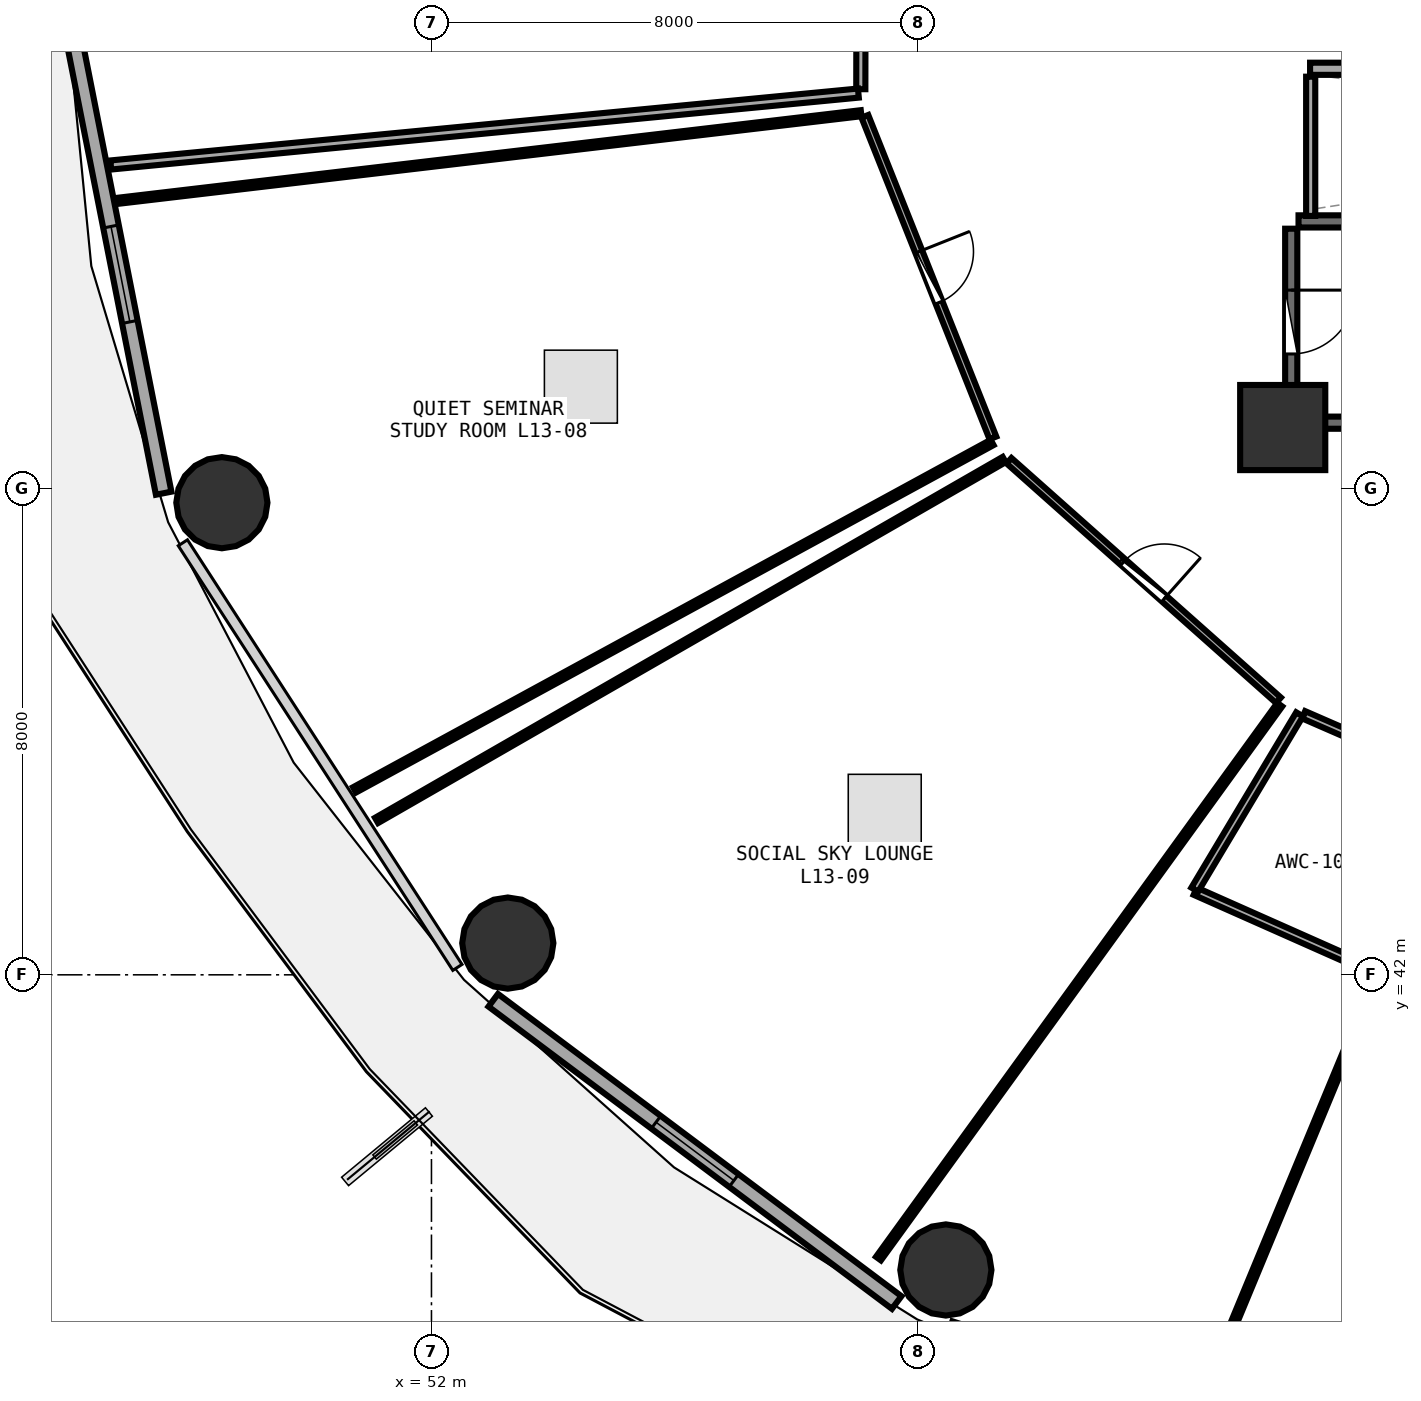
"""IFC4 building model, lengths in metres.
Left out: names, types, materials, properties, quantities, classifications, styles, units other than length and angle.
Written with IfcOpenShell. Run it as: python <this file> out.ifc"""

import sys

from ifc_helpers import new_model, si_unit, direction, frame, frame_2d, origin, origin_2d, place, context, subcontext, project, spatial, rectangle, circle, extrude, element, fill, save


model = new_model("IFC4")
c1 = context("Model", 3, precision=1e-05, world=origin(), true_north=direction((0.0, 1.0)))
c2 = subcontext(c1, "Body", "Model", "MODEL_VIEW")
j1 = project(units=[si_unit("LENGTHUNIT", "METRE"), si_unit("PLANEANGLEUNIT", "RADIAN")], contexts=[c1])
p1 = place(None, origin())
s1 = spatial("IfcSite", under=j1, at=p1, CompositionType="ELEMENT")
p2 = place(p1, origin())
s2 = spatial("IfcBuilding", under=s1, at=p2, CompositionType="ELEMENT")
p3 = place(p2, frame((0.0, 0.0, 52.5)))
s3 = spatial("IfcBuildingStorey", under=s2, at=p3, CompositionType="ELEMENT", Elevation=52.5)
p4 = place(p3, frame((66.0, 51.0, 0.0), z_axis=(0.0, 0.0, 1.0), x_axis=(1.0, 0.0, 0.0)))
e1 = element("IfcColumn", 1, at=p4, inside=s3, PredefinedType="PILASTER", context=c2, shape_type="SweptSolid", body=[
    extrude(rectangle(XDim=1.4, YDim=1.4, at=origin_2d()), origin(), (0.0, 0.0, 1.0), 3.75),
])
for number, where, z_axis, x_axis in (
    (2, (48.553, 49.764, 0.0), (0.0, 0.0, 1.0), (1.0, 0.0, 0.0)),
    (3, (53.256, 42.522, 0.0), (0.0, 0.0, 1.0), (1.0, 0.0, 0.0)),
    (4, (60.46, 37.146, 0.0), (0.0, 0.0, 1.0), (1.0, 0.0, 0.0)),
):
    element("IfcColumn", number, at=place(p3, frame(where, z_axis=z_axis, x_axis=x_axis)), inside=s3, PredefinedType="COLUMN", context=c2, shape_type="SweptSolid", body=[
        extrude(circle(Radius=0.75, at=origin_2d()), origin(), (0.0, 0.0, 1.0), 3.75),
    ])
p5 = place(p3, frame((46.104, 57.477, 0.0), z_axis=(0.0, 0.0, 1.0), x_axis=(0.193726159581, -0.98105564322, 0.0)))
e5 = element("IfcWall", 5, at=p5, inside=s3, PredefinedType="SOLIDWALL", context=c2, shape_type="SweptSolid", body=[
    extrude(rectangle(XDim=7.703, YDim=0.26, at=frame_2d((3.851, 0.0))), origin(), (0.0, 0.0, 1.0), 3.475),
])
p6 = place(p5, frame((3.231, 0.0, 0.85)))
e6 = element("IfcOpeningElement", 6, at=p6, cuts=e5, PredefinedType="OPENING", context=c2, shape_type="SweptSolid", body=[
    extrude(rectangle(XDim=1.6, YDim=1.45, at=frame_2d((0.8, 0.725))), frame((0.0, 0.14, 0.0), z_axis=(0.0, -1.0, 0.0), x_axis=(1.0, 0.0, 0.0)), (0.0, 0.0, 1.0), 0.28),
])
p7 = place(p3, frame((53.016, 41.582, 0.0), z_axis=(0.0, 0.0, 1.0), x_axis=(0.80030733173, -0.599590005569, 0.0)))
e7 = element("IfcWall", 7, at=p7, inside=s3, PredefinedType="SOLIDWALL", context=c2, shape_type="SweptSolid", body=[
    extrude(rectangle(XDim=8.291, YDim=0.26, at=frame_2d((4.145, 0.0))), origin(), (0.0, 0.0, 1.0), 3.475),
])
p8 = place(p7, frame((3.345, 0.0, 0.85)))
e8 = element("IfcOpeningElement", 8, at=p8, cuts=e7, PredefinedType="OPENING", context=c2, shape_type="SweptSolid", body=[
    extrude(rectangle(XDim=1.6, YDim=1.45, at=frame_2d((0.8, 0.725))), frame((0.0, 0.14, 0.0), z_axis=(0.0, -1.0, 0.0), x_axis=(1.0, 0.0, 0.0)), (0.0, 0.0, 1.0), 0.28),
])
p9 = place(p3, frame((60.526, 36.178, 0.0), z_axis=(0.0, 0.0, 1.0), x_axis=(0.951039914291, -0.309068085421, 0.0)))
e9 = element("IfcWall", 9, at=p9, inside=s3, PredefinedType="SOLIDWALL", context=c2, shape_type="SweptSolid", body=[
    extrude(rectangle(XDim=8.594, YDim=0.26, at=frame_2d((4.297, 0.0))), origin(), (0.0, 0.0, 1.0), 3.475),
])
p10 = place(p9, frame((4.577, 0.0, 0.85)))
e10 = element("IfcOpeningElement", 10, at=p10, cuts=e9, PredefinedType="OPENING", context=c2, shape_type="SweptSolid", body=[
    extrude(rectangle(XDim=1.6, YDim=1.45, at=frame_2d((0.8, 0.725))), frame((0.0, 0.14, 0.0), z_axis=(0.0, -1.0, 0.0), x_axis=(1.0, 0.0, 0.0)), (0.0, 0.0, 1.0), 0.28),
])
for number, where, z_axis, x_axis in (
    (11, (66.26, 51.08, 0.0), (0.0, 0.0, 1.0), (1.0, 0.0, 0.0)),
    (12, (73.42, 54.39, 0.0), (0.0, 0.0, 1.0), (-1.0, 0.0, 0.0)),
):
    element("IfcWall", number, at=place(p3, frame(where, z_axis=z_axis, x_axis=x_axis)), inside=s3, PredefinedType="SHEAR", context=c2, shape_type="SweptSolid", body=[
        extrude(rectangle(XDim=7.16, YDim=0.2, at=frame_2d((3.58, 0.0))), origin(), (0.0, 0.0, 1.0), 3.49),
    ])
p11 = place(p3, frame((66.14, 54.27, 0.0), z_axis=(0.0, 0.0, 1.0), x_axis=(0.0, -1.0, 0.0)))
e13 = element("IfcWall", 13, at=p11, inside=s3, PredefinedType="SHEAR", context=c2, shape_type="SweptSolid", body=[
    extrude(rectangle(XDim=3.07, YDim=0.2, at=frame_2d((1.535, 0.0))), origin(), (0.0, 0.0, 1.0), 3.49),
])
p12 = place(p11, frame((1.01, 0.0, 0.0)))
e14 = element("IfcOpeningElement", 14, at=p12, cuts=e13, PredefinedType="OPENING", context=c2, shape_type="SweptSolid", body=[
    extrude(rectangle(XDim=1.05, YDim=2.1, at=frame_2d((0.525, 1.05))), frame((0.0, 0.11, 0.0), z_axis=(0.0, -1.0, 0.0), x_axis=(1.0, 0.0, 0.0)), (0.0, 0.0, 1.0), 0.22),
])
p13 = place(p3, frame((66.45, 56.9, 0.0), z_axis=(0.0, 0.0, 1.0), x_axis=(1.0, 0.0, 0.0)))
e15 = element("IfcWall", 15, at=p13, inside=s3, PredefinedType="SOLIDWALL", context=c2, shape_type="SweptSolid", body=[
    extrude(rectangle(XDim=14.4, YDim=0.2, at=frame_2d((7.2, 0.0))), origin(), (0.0, 0.0, 1.0), 3.48),
])
p14 = place(p3, frame((66.46, 54.48, 0.0), z_axis=(0.0, 0.0, 1.0), x_axis=(0.0, 1.0, 0.0)))
e16 = element("IfcWall", 16, at=p14, inside=s3, PredefinedType="PARTITIONING", context=c2, shape_type="SweptSolid", body=[
    extrude(rectangle(XDim=2.29, YDim=0.15, at=frame_2d((1.145, 0.0))), origin(), (0.0, 0.0, 1.0), 3.48),
])
p15 = place(p3, frame((59.066, 59.475, 0.0), z_axis=(0.0, 0.0, 1.0), x_axis=(-0.001677287141, -0.999998593353, 0.0)))
e17 = element("IfcWall", 17, at=p15, inside=s3, PredefinedType="PARTITIONING", context=c2, shape_type="SweptSolid", body=[
    extrude(rectangle(XDim=2.911, YDim=0.15, at=frame_2d((1.456, 0.0))), origin(), (0.0, 0.0, 1.0), 2.875),
])
p16 = place(p15, frame((0.981, 0.0, 0.0)))
e18 = element("IfcOpeningElement", 18, at=p16, cuts=e17, PredefinedType="OPENING", context=c2, shape_type="SweptSolid", body=[
    extrude(rectangle(XDim=0.95, YDim=2.08, at=frame_2d((0.475, 1.04))), frame((0.0, 0.085, 0.0), z_axis=(0.0, -1.0, 0.0), x_axis=(1.0, 0.0, 0.0)), (0.0, 0.0, 1.0), 0.17),
])
p17 = place(p3, frame((59.128, 56.118, 0.0), z_axis=(0.0, 0.0, 1.0), x_axis=(0.369903929858, -0.929070009566, 0.0)))
e19 = element("IfcWall", 19, at=p17, inside=s3, PredefinedType="PARTITIONING", context=c2, shape_type="SweptSolid", body=[
    extrude(rectangle(XDim=5.693, YDim=0.12, at=frame_2d((2.846, 0.0))), origin(), (0.0, 0.0, 1.0), 2.875),
])
p18 = place(p17, frame((2.396, 0.0, 0.0)))
e20 = element("IfcOpeningElement", 20, at=p18, cuts=e19, PredefinedType="OPENING", context=c2, shape_type="SweptSolid", body=[
    extrude(rectangle(XDim=0.9, YDim=2.08, at=frame_2d((0.45, 1.04))), frame((0.0, 0.07, 0.0), z_axis=(0.0, -1.0, 0.0), x_axis=(1.0, 0.0, 0.0)), (0.0, 0.0, 1.0), 0.14),
])
p19 = place(p3, frame((61.499, 50.454, 0.0), z_axis=(0.0, 0.0, 1.0), x_axis=(0.747393415848, -0.664381729089, 0.0)))
e21 = element("IfcWall", 21, at=p19, inside=s3, PredefinedType="PARTITIONING", context=c2, shape_type="SweptSolid", body=[
    extrude(rectangle(XDim=5.929, YDim=0.12, at=frame_2d((2.965, 0.0))), origin(), (0.0, 0.0, 1.0), 2.875),
])
p20 = place(p19, frame((2.515, 0.0, 0.0)))
e22 = element("IfcOpeningElement", 22, at=p20, cuts=e21, PredefinedType="OPENING", context=c2, shape_type="SweptSolid", body=[
    extrude(rectangle(XDim=0.9, YDim=2.08, at=frame_2d((0.45, 1.04))), frame((0.0, 0.07, 0.0), z_axis=(0.0, -1.0, 0.0), x_axis=(1.0, 0.0, 0.0)), (0.0, 0.0, 1.0), 0.14),
])
p21 = place(p3, frame((66.343, 46.277, 0.0), z_axis=(0.0, 0.0, 1.0), x_axis=(0.916688793476, -0.399601871763, 0.0)))
e23 = element("IfcWall", 23, at=p21, inside=s3, PredefinedType="PLUMBINGWALL", context=c2, shape_type="SweptSolid", body=[
    extrude(rectangle(XDim=2.558, YDim=0.13, at=frame_2d((1.279, 0.0))), origin(), (0.0, 0.0, 1.0), 2.875),
])
p22 = place(p21, frame((0.849, 0.0, 0.0)))
e24 = element("IfcOpeningElement", 24, at=p22, cuts=e23, PredefinedType="OPENING", context=c2, shape_type="SweptSolid", body=[
    extrude(rectangle(XDim=0.86, YDim=2.05, at=frame_2d((0.43, 1.025))), frame((0.0, 0.075, 0.0), z_axis=(0.0, -1.0, 0.0), x_axis=(1.0, 0.0, 0.0)), (0.0, 0.0, 1.0), 0.15),
])
p23 = place(p3, frame((59.021, 56.5, 0.0), z_axis=(0.0, 0.0, 1.0), x_axis=(-0.995408087514, -0.095722198638, 0.0)))
e25 = element("IfcWall", 25, at=p23, inside=s3, PredefinedType="PARTITIONING", context=c2, shape_type="SweptSolid", body=[
    extrude(rectangle(XDim=12.352, YDim=0.15, at=frame_2d((6.176, 0.0))), origin(), (0.0, 0.0, 1.0), 2.875),
])
p24 = place(p3, frame((61.221, 50.755, 0.0), z_axis=(0.0, 0.0, 1.0), x_axis=(-0.878114235828, -0.478451030761, 0.0)))
e26 = element("IfcWall", 26, at=p24, inside=s3, PredefinedType="PARTITIONING", context=c2, shape_type="SweptSolid", body=[
    extrude(rectangle(XDim=11.942, YDim=0.1, at=frame_2d((5.971, 0.0))), origin(), (0.0, 0.0, 1.0), 2.875),
])
p25 = place(p3, frame((46.808, 54.725, 0.0), z_axis=(0.0, 0.0, 1.0), x_axis=(0.993128309916, 0.117030594475, 0.0)))
e27 = element("IfcWall", 27, at=p25, inside=s3, PredefinedType="PARTITIONING", context=c2, shape_type="SweptSolid", body=[
    extrude(rectangle(XDim=12.344, YDim=0.1, at=frame_2d((6.172, 0.0))), origin(), (0.0, 0.0, 1.0), 2.875),
])
p26 = place(p3, frame((65.951, 46.443, 0.0), z_axis=(0.0, 0.0, 1.0), x_axis=(-0.586718941426, -0.809790641939, 0.0)))
e28 = element("IfcWall", 28, at=p26, inside=s3, PredefinedType="PARTITIONING", context=c2, shape_type="SweptSolid", body=[
    extrude(rectangle(XDim=11.249, YDim=0.1, at=frame_2d((5.625, 0.0))), origin(), (0.0, 0.0, 1.0), 2.875),
])
p27 = place(p3, frame((51.097, 44.539, 0.0), z_axis=(0.0, 0.0, 1.0), x_axis=(0.866911397605, 0.498462264071, 0.0)))
e29 = element("IfcWall", 29, at=p27, inside=s3, PredefinedType="PARTITIONING", context=c2, shape_type="SweptSolid", body=[
    extrude(rectangle(XDim=11.907, YDim=0.1, at=frame_2d((5.954, 0.0))), origin(), (0.0, 0.0, 1.0), 2.875),
])
p28 = place(p3, frame((67.536, 42.054, 0.0), z_axis=(0.0, 0.0, 1.0), x_axis=(-0.913941429535, 0.405846108002, 0.0)))
e30 = element("IfcWall", 30, at=p28, inside=s3, PredefinedType="PLUMBINGWALL", context=c2, shape_type="SweptSolid", body=[
    extrude(rectangle(XDim=3.254, YDim=0.13, at=frame_2d((1.627, 0.0))), origin(), (0.0, 0.0, 1.0), 3.48),
])
p29 = place(p3, frame((64.553, 43.4, 0.0), z_axis=(0.0, 0.0, 1.0), x_axis=(0.513234244366, 0.858248571458, 0.0)))
e31 = element("IfcWall", 31, at=p29, inside=s3, PredefinedType="PLUMBINGWALL", context=c2, shape_type="SweptSolid", body=[
    extrude(rectangle(XDim=3.36, YDim=0.13, at=frame_2d((1.68, 0.0))), origin(), (0.0, 0.0, 1.0), 3.235),
])
p30 = place(p3, frame((64.673, 35.015, 0.0), z_axis=(0.0, 0.0, 1.0), x_axis=(0.383188399733, 0.923670206464, 0.0)))
e32 = element("IfcWall", 32, at=p30, inside=s3, PredefinedType="PARTITIONING", context=c2, shape_type="SweptSolid", body=[
    extrude(rectangle(XDim=7.619, YDim=0.1, at=frame_2d((3.81, 0.0))), origin(), (0.0, 0.0, 1.0), 2.875),
])
p31 = place(p6, origin())
e33 = element("IfcWindow", 33, at=p31, inside=s3, PartitioningType="SINGLE_PANEL", PredefinedType="WINDOW", context=c2, shape_type="SweptSolid", body=[
    extrude(rectangle(XDim=1.6, YDim=1.45, at=frame_2d((0.8, 0.725))), frame((0.0, 0.03, 0.0), z_axis=(0.0, -1.0, 0.0), x_axis=(1.0, 0.0, 0.0)), (0.0, 0.0, 1.0), 0.06),
])
fill(e6, e33)
p32 = place(p8, origin())
e34 = element("IfcWindow", 34, at=p32, inside=s3, PartitioningType="SINGLE_PANEL", PredefinedType="WINDOW", context=c2, shape_type="SweptSolid", body=[
    extrude(rectangle(XDim=1.6, YDim=1.45, at=frame_2d((0.8, 0.725))), frame((0.0, 0.03, 0.0), z_axis=(0.0, -1.0, 0.0), x_axis=(1.0, 0.0, 0.0)), (0.0, 0.0, 1.0), 0.06),
])
fill(e8, e34)
p33 = place(p12, origin())
e35 = element("IfcDoor", 35, at=p33, inside=s3, OperationType="SINGLE_SWING_LEFT", PredefinedType="DOOR", context=c2, shape_type="SweptSolid", body=[
    extrude(rectangle(XDim=1.05, YDim=2.1, at=frame_2d((0.525, 1.05))), frame((0.0, 0.025, 0.0), z_axis=(0.0, -1.0, 0.0), x_axis=(1.0, 0.0, 0.0)), (0.0, 0.0, 1.0), 0.05),
])
fill(e14, e35)
p34 = place(p18, origin())
e36 = element("IfcDoor", 36, at=p34, inside=s3, OperationType="SINGLE_SWING_LEFT", PredefinedType="DOOR", context=c2, shape_type="SweptSolid", body=[
    extrude(rectangle(XDim=0.9, YDim=2.08, at=frame_2d((0.45, 1.04))), frame((0.0, 0.025, 0.0), z_axis=(0.0, -1.0, 0.0), x_axis=(1.0, 0.0, 0.0)), (0.0, 0.0, 1.0), 0.05),
])
fill(e20, e36)
p35 = place(p20, origin())
e37 = element("IfcDoor", 37, at=p35, inside=s3, OperationType="SINGLE_SWING_RIGHT", PredefinedType="DOOR", context=c2, shape_type="SweptSolid", body=[
    extrude(rectangle(XDim=0.9, YDim=2.08, at=frame_2d((0.45, 1.04))), frame((0.0, 0.025, 0.0), z_axis=(0.0, -1.0, 0.0), x_axis=(1.0, 0.0, 0.0)), (0.0, 0.0, 1.0), 0.05),
])
fill(e22, e37)
save(model, sys.argv[1])
